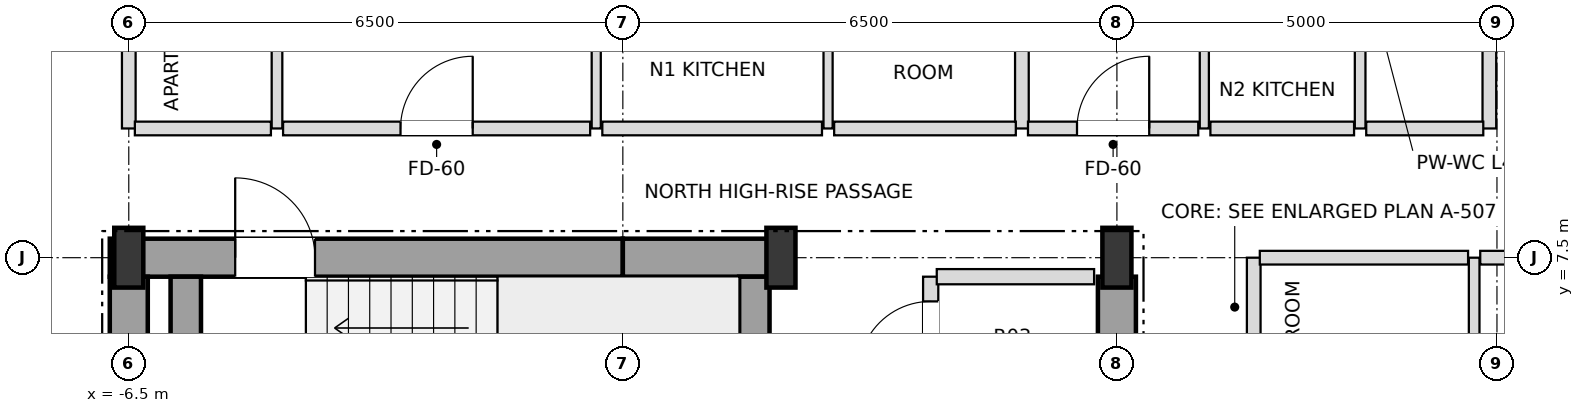
"""IFC4 building model, lengths in metres.
Left out: names, types, materials, properties, quantities, classifications, styles, units other than length and angle.
Written with IfcOpenShell. Run it as: python <this file> out.ifc"""

import sys

from ifc_helpers import new_model, si_unit, direction, frame, frame_2d, origin, origin_2d, place, context, subcontext, project, spatial, rectangle, i_section, extrude, element, fill, save


model = new_model("IFC4")
c1 = context("Model", 3, precision=1e-05, world=origin(), true_north=direction((0.0, 1.0)))
c2 = subcontext(c1, "Body", "Model", "MODEL_VIEW")
j1 = project(units=[si_unit("LENGTHUNIT", "METRE"), si_unit("PLANEANGLEUNIT", "RADIAN")], contexts=[c1])
p1 = place(None, origin())
s1 = spatial("IfcSite", under=j1, at=p1, CompositionType="ELEMENT")
p2 = place(p1, origin())
s2 = spatial("IfcBuilding", under=s1, at=p2, CompositionType="ELEMENT")
p3 = place(p2, frame((0.0, 0.0, 276.3)))
s3 = spatial("IfcBuildingStorey", under=s2, at=p3, CompositionType="ELEMENT", Elevation=276.3)
for number, where, z_axis, x_axis in (
    (1, (-6.5, 7.5, 0.0), (0.0, 0.0, 1.0), (1.0, 0.0, 0.0)),
    (2, (2.08, 7.5, 0.0), (0.0, 0.0, 1.0), (1.0, 0.0, 0.0)),
    (3, (6.5, 7.5, 0.0), (0.0, 0.0, 1.0), (1.0, 0.0, 0.0)),
):
    element("IfcColumn", number, at=place(p3, frame(where, z_axis=z_axis, x_axis=x_axis)), inside=s3, PredefinedType="COLUMN", context=c2, shape_type="SweptSolid", body=[
        extrude(i_section(OverallWidth=0.382, OverallDepth=0.786, WebThickness=0.02, FlangeThickness=0.033, at=origin_2d()), origin(), (0.0, 0.0, 1.0), 3.6),
    ])
p4 = place(p3, frame((-6.75, 7.5, 0.0), z_axis=(0.0, 0.0, 1.0), x_axis=(1.0, 0.0, 0.0)))
e4 = element("IfcWall", 4, at=p4, inside=s3, PredefinedType="SHEAR", context=c2, shape_type="SweptSolid", body=[
    extrude(rectangle(XDim=6.75, YDim=0.5, at=frame_2d((3.375, 0.0))), origin(), (0.0, 0.0, 1.0), 3.38),
])
p5 = place(p4, frame((1.65, 0.0, 0.0)))
e5 = element("IfcOpeningElement", 5, at=p5, cuts=e4, PredefinedType="OPENING", context=c2, shape_type="SweptSolid", body=[
    extrude(rectangle(XDim=1.05, YDim=2.15, at=frame_2d((0.525, 1.075))), frame((0.0, 0.26, 0.0), z_axis=(0.0, -1.0, 0.0), x_axis=(1.0, 0.0, 0.0)), (0.0, 0.0, 1.0), 0.52),
])
p6 = place(p3, frame((0.0, 7.5, 0.0), z_axis=(0.0, 0.0, 1.0), x_axis=(1.0, 0.0, 0.0)))
e6 = element("IfcWall", 6, at=p6, inside=s3, PredefinedType="SHEAR", context=c2, shape_type="SweptSolid", body=[
    extrude(rectangle(XDim=2.08, YDim=0.5, at=frame_2d((1.04, 0.0))), origin(), (0.0, 0.0, 1.0), 3.38),
])
for number, where, z_axis, x_axis in (
    (7, (-6.5, 3.95, 0.0), (0.0, 0.0, 1.0), (0.0, 1.0, 0.0)),
    (8, (6.5, 3.95, 0.0), (0.0, 0.0, 1.0), (0.0, 1.0, 0.0)),
):
    element("IfcWall", number, at=place(p3, frame(where, z_axis=z_axis, x_axis=x_axis)), inside=s3, PredefinedType="SHEAR", context=c2, shape_type="SweptSolid", body=[
        extrude(rectangle(XDim=3.3, YDim=0.5, at=frame_2d((1.65, 0.0))), origin(), (0.0, 0.0, 1.0), 3.38),
    ])
for number, where, z_axis, x_axis in (
    (9, (1.73, 3.95, 0.0), (0.0, 0.0, 1.0), (0.0, 1.0, 0.0)),
    (10, (-5.75, 3.95, 0.0), (0.0, 0.0, 1.0), (0.0, 1.0, 0.0)),
):
    element("IfcWall", number, at=place(p3, frame(where, z_axis=z_axis, x_axis=x_axis)), inside=s3, PredefinedType="SHEAR", context=c2, shape_type="SweptSolid", body=[
        extrude(rectangle(XDim=3.3, YDim=0.4, at=frame_2d((1.65, 0.0))), origin(), (0.0, 0.0, 1.0), 3.38),
    ])
p7 = place(p3, frame((-6.5, 9.2, 0.0), z_axis=(0.0, 0.0, 1.0), x_axis=(0.0, 1.0, 0.0)))
e11 = element("IfcWall", 11, at=p7, inside=s3, PredefinedType="PARTITIONING", context=c2, shape_type="SweptSolid", body=[
    extrude(rectangle(XDim=10.7, YDim=0.18, at=frame_2d((5.35, 0.0))), origin(), (0.0, 0.0, 1.0), 2.826),
])
p8 = place(p3, frame((-4.55, 9.2, 0.0), z_axis=(0.0, 0.0, 1.0), x_axis=(0.0, 1.0, 0.0)))
e12 = element("IfcWall", 12, at=p8, inside=s3, PredefinedType="PARTITIONING", context=c2, shape_type="SweptSolid", body=[
    extrude(rectangle(XDim=4.7, YDim=0.14, at=frame_2d((2.35, 0.0))), origin(), (0.0, 0.0, 1.0), 3.38),
])
p9 = place(p8, frame((1.9, 0.0, 0.0)))
e13 = element("IfcOpeningElement", 13, at=p9, cuts=e12, PredefinedType="OPENING", context=c2, shape_type="SweptSolid", body=[
    extrude(rectangle(XDim=0.9, YDim=2.1, at=frame_2d((0.45, 1.05))), frame((0.0, 0.08, 0.0), z_axis=(0.0, -1.0, 0.0), x_axis=(1.0, 0.0, 0.0)), (0.0, 0.0, 1.0), 0.16),
])
p10 = place(p3, frame((-0.35, 9.2, 0.0), z_axis=(0.0, 0.0, 1.0), x_axis=(0.0, 1.0, 0.0)))
e14 = element("IfcWall", 14, at=p10, inside=s3, PredefinedType="PARTITIONING", context=c2, shape_type="SweptSolid", body=[
    extrude(rectangle(XDim=4.7, YDim=0.12, at=frame_2d((2.35, 0.0))), origin(), (0.0, 0.0, 1.0), 3.38),
])
p11 = place(p10, frame((1.875, 0.0, 0.0)))
e15 = element("IfcOpeningElement", 15, at=p11, cuts=e14, PredefinedType="OPENING", context=c2, shape_type="SweptSolid", body=[
    extrude(rectangle(XDim=0.95, YDim=2.1, at=frame_2d((0.475, 1.05))), frame((0.0, 0.07, 0.0), z_axis=(0.0, -1.0, 0.0), x_axis=(1.0, 0.0, 0.0)), (0.0, 0.0, 1.0), 0.14),
])
p12 = place(p3, frame((2.7, 9.2, 0.0), z_axis=(0.0, 0.0, 1.0), x_axis=(0.0, 1.0, 0.0)))
e16 = element("IfcWall", 16, at=p12, inside=s3, PredefinedType="PARTITIONING", context=c2, shape_type="SweptSolid", body=[
    extrude(rectangle(XDim=4.7, YDim=0.12, at=frame_2d((2.35, 0.0))), origin(), (0.0, 0.0, 1.0), 3.38),
])
p13 = place(p12, frame((1.9, 0.0, 0.0)))
e17 = element("IfcOpeningElement", 17, at=p13, cuts=e16, PredefinedType="OPENING", context=c2, shape_type="SweptSolid", body=[
    extrude(rectangle(XDim=0.9, YDim=2.1, at=frame_2d((0.45, 1.05))), frame((0.0, 0.07, 0.0), z_axis=(0.0, -1.0, 0.0), x_axis=(1.0, 0.0, 0.0)), (0.0, 0.0, 1.0), 0.14),
])
p14 = place(p3, frame((4.05, 0.45, 0.0), z_axis=(0.0, 0.0, 1.0), x_axis=(0.0, 1.0, 0.0)))
e18 = element("IfcWall", 18, at=p14, inside=s3, PredefinedType="SOLIDWALL", context=c2, shape_type="SweptSolid", body=[
    extrude(rectangle(XDim=6.8, YDim=0.2, at=frame_2d((3.4, 0.0))), origin(), (0.0, 0.0, 1.0), 3.38),
])
p15 = place(p14, frame((1.875, 0.0, 0.0)))
e19 = element("IfcOpeningElement", 19, at=p15, cuts=e18, PredefinedType="OPENING", context=c2, shape_type="SweptSolid", body=[
    extrude(rectangle(XDim=0.95, YDim=2.15, at=frame_2d((0.475, 1.075))), frame((0.0, 0.11, 0.0), z_axis=(0.0, -1.0, 0.0), x_axis=(1.0, 0.0, 0.0)), (0.0, 0.0, 1.0), 0.22),
])
p16 = place(p14, frame((5.525, 0.0, 0.0)))
e20 = element("IfcOpeningElement", 20, at=p16, cuts=e18, PredefinedType="OPENING", context=c2, shape_type="SweptSolid", body=[
    extrude(rectangle(XDim=0.95, YDim=2.15, at=frame_2d((0.475, 1.075))), frame((0.0, 0.11, 0.0), z_axis=(0.0, -1.0, 0.0), x_axis=(1.0, 0.0, 0.0)), (0.0, 0.0, 1.0), 0.22),
])
p17 = place(p3, frame((5.25, 9.2, 0.0), z_axis=(0.0, 0.0, 1.0), x_axis=(0.0, 1.0, 0.0)))
e21 = element("IfcWall", 21, at=p17, inside=s3, PredefinedType="PARTITIONING", context=c2, shape_type="SweptSolid", body=[
    extrude(rectangle(XDim=10.7, YDim=0.18, at=frame_2d((5.35, 0.0))), origin(), (0.0, 0.0, 1.0), 3.018),
])
p18 = place(p3, frame((7.65, 9.2, 0.0), z_axis=(0.0, 0.0, 1.0), x_axis=(0.0, 1.0, 0.0)))
e22 = element("IfcWall", 22, at=p18, inside=s3, PredefinedType="PARTITIONING", context=c2, shape_type="SweptSolid", body=[
    extrude(rectangle(XDim=4.7, YDim=0.12, at=frame_2d((2.35, 0.0))), origin(), (0.0, 0.0, 1.0), 2.826),
])
p19 = place(p18, frame((1.875, 0.0, 0.0)))
e23 = element("IfcOpeningElement", 23, at=p19, cuts=e22, PredefinedType="OPENING", context=c2, shape_type="SweptSolid", body=[
    extrude(rectangle(XDim=0.95, YDim=2.1, at=frame_2d((0.475, 1.05))), frame((0.0, 0.07, 0.0), z_axis=(0.0, -1.0, 0.0), x_axis=(1.0, 0.0, 0.0)), (0.0, 0.0, 1.0), 0.14),
])
p20 = place(p3, frame((8.3, -7.5, 0.0), z_axis=(0.0, 0.0, 1.0), x_axis=(0.0, 1.0, 0.0)))
e24 = element("IfcWall", 24, at=p20, inside=s3, PredefinedType="PARTITIONING", context=c2, shape_type="SweptSolid", body=[
    extrude(rectangle(XDim=15.0, YDim=0.18, at=frame_2d((7.5, 0.0))), origin(), (0.0, 0.0, 1.0), 3.38),
])
p21 = place(p20, frame((2.355, 0.0, 0.0)))
e25 = element("IfcOpeningElement", 25, at=p21, cuts=e24, PredefinedType="OPENING", context=c2, shape_type="SweptSolid", body=[
    extrude(rectangle(XDim=0.95, YDim=2.15, at=frame_2d((0.475, 1.075))), frame((0.0, 0.1, 0.0), z_axis=(0.0, -1.0, 0.0), x_axis=(1.0, 0.0, 0.0)), (0.0, 0.0, 1.0), 0.2),
])
p22 = place(p3, frame((9.7, 9.2, 0.0), z_axis=(0.0, 0.0, 1.0), x_axis=(0.0, 1.0, 0.0)))
e26 = element("IfcWall", 26, at=p22, inside=s3, PredefinedType="PARTITIONING", context=c2, shape_type="SweptSolid", body=[
    extrude(rectangle(XDim=4.7, YDim=0.14, at=frame_2d((2.35, 0.0))), origin(), (0.0, 0.0, 1.0), 2.826),
])
p23 = place(p22, frame((1.9, 0.0, 0.0)))
e27 = element("IfcOpeningElement", 27, at=p23, cuts=e26, PredefinedType="OPENING", context=c2, shape_type="SweptSolid", body=[
    extrude(rectangle(XDim=0.9, YDim=2.1, at=frame_2d((0.45, 1.05))), frame((0.0, 0.08, 0.0), z_axis=(0.0, -1.0, 0.0), x_axis=(1.0, 0.0, 0.0)), (0.0, 0.0, 1.0), 0.16),
])
p24 = place(p3, frame((11.2, -7.5, 0.0), z_axis=(0.0, 0.0, 1.0), x_axis=(0.0, 1.0, 0.0)))
e28 = element("IfcWall", 28, at=p24, inside=s3, PredefinedType="PARTITIONING", context=c2, shape_type="SweptSolid", body=[
    extrude(rectangle(XDim=15.0, YDim=0.14, at=frame_2d((7.5, 0.0))), origin(), (0.0, 0.0, 1.0), 3.38),
])
p25 = place(p24, frame((3.475, 0.0, 0.0)))
e29 = element("IfcOpeningElement", 29, at=p25, cuts=e28, PredefinedType="OPENING", context=c2, shape_type="SweptSolid", body=[
    extrude(rectangle(XDim=0.95, YDim=2.1, at=frame_2d((0.475, 1.05))), frame((0.0, 0.08, 0.0), z_axis=(0.0, -1.0, 0.0), x_axis=(1.0, 0.0, 0.0)), (0.0, 0.0, 1.0), 0.16),
])
p26 = place(p3, frame((11.4, 9.2, 0.0), z_axis=(0.0, 0.0, 1.0), x_axis=(0.0, 1.0, 0.0)))
e30 = element("IfcWall", 30, at=p26, inside=s3, PredefinedType="PARTITIONING", context=c2, shape_type="SweptSolid", body=[
    extrude(rectangle(XDim=5.07, YDim=0.18, at=frame_2d((2.535, 0.0))), origin(), (0.0, 0.0, 1.0), 2.748),
])
p27 = place(p3, frame((4.13, 7.25, 0.0), z_axis=(0.0, 0.0, 1.0), x_axis=(1.0, 0.0, 0.0)))
e31 = element("IfcWall", 31, at=p27, inside=s3, PredefinedType="SOLIDWALL", context=c2, shape_type="SweptSolid", body=[
    extrude(rectangle(XDim=2.07, YDim=0.2, at=frame_2d((1.035, 0.0))), origin(), (0.0, 0.0, 1.0), 3.38),
])
p28 = place(p3, frame((8.38, 7.5, 0.0), z_axis=(0.0, 0.0, 1.0), x_axis=(1.0, 0.0, 0.0)))
e32 = element("IfcWall", 32, at=p28, inside=s3, PredefinedType="PARTITIONING", context=c2, shape_type="SweptSolid", body=[
    extrude(rectangle(XDim=2.74, YDim=0.18, at=frame_2d((1.37, 0.0))), origin(), (0.0, 0.0, 1.0), 2.826),
])
p29 = place(p3, frame((11.28, 7.5, 0.0), z_axis=(0.0, 0.0, 1.0), x_axis=(1.0, 0.0, 0.0)))
e33 = element("IfcWall", 33, at=p29, inside=s3, PredefinedType="PARTITIONING", context=c2, shape_type="SweptSolid", body=[
    extrude(rectangle(XDim=5.62, YDim=0.18, at=frame_2d((2.81, 0.0))), origin(), (0.0, 0.0, 1.0), 2.826),
])
p30 = place(p3, frame((-6.42, 9.2, 0.0), z_axis=(0.0, 0.0, 1.0), x_axis=(1.0, 0.0, 0.0)))
e34 = element("IfcWall", 34, at=p30, inside=s3, PredefinedType="PARTITIONING", context=c2, shape_type="SweptSolid", body=[
    extrude(rectangle(XDim=1.79, YDim=0.18, at=frame_2d((0.895, 0.0))), origin(), (0.0, 0.0, 1.0), 3.38),
])
p31 = place(p3, frame((-4.47, 9.2, 0.0), z_axis=(0.0, 0.0, 1.0), x_axis=(1.0, 0.0, 0.0)))
e35 = element("IfcWall", 35, at=p31, inside=s3, PredefinedType="PARTITIONING", context=c2, shape_type="SweptSolid", body=[
    extrude(rectangle(XDim=4.04, YDim=0.18, at=frame_2d((2.02, 0.0))), origin(), (0.0, 0.0, 1.0), 3.38),
])
p32 = place(p31, frame((1.545, 0.0, 0.0)))
e36 = element("IfcOpeningElement", 36, at=p32, cuts=e35, PredefinedType="OPENING", context=c2, shape_type="SweptSolid", body=[
    extrude(rectangle(XDim=0.95, YDim=2.15, at=frame_2d((0.475, 1.075))), frame((0.0, 0.1, 0.0), z_axis=(0.0, -1.0, 0.0), x_axis=(1.0, 0.0, 0.0)), (0.0, 0.0, 1.0), 0.2),
])
p33 = place(p3, frame((-0.27, 9.2, 0.0), z_axis=(0.0, 0.0, 1.0), x_axis=(1.0, 0.0, 0.0)))
e37 = element("IfcWall", 37, at=p33, inside=s3, PredefinedType="PARTITIONING", context=c2, shape_type="SweptSolid", body=[
    extrude(rectangle(XDim=2.89, YDim=0.18, at=frame_2d((1.445, 0.0))), origin(), (0.0, 0.0, 1.0), 3.38),
])
p34 = place(p3, frame((2.78, 9.2, 0.0), z_axis=(0.0, 0.0, 1.0), x_axis=(1.0, 0.0, 0.0)))
e38 = element("IfcWall", 38, at=p34, inside=s3, PredefinedType="PARTITIONING", context=c2, shape_type="SweptSolid", body=[
    extrude(rectangle(XDim=2.39, YDim=0.18, at=frame_2d((1.195, 0.0))), origin(), (0.0, 0.0, 1.0), 3.38),
])
p35 = place(p3, frame((5.33, 9.2, 0.0), z_axis=(0.0, 0.0, 1.0), x_axis=(1.0, 0.0, 0.0)))
e39 = element("IfcWall", 39, at=p35, inside=s3, PredefinedType="PARTITIONING", context=c2, shape_type="SweptSolid", body=[
    extrude(rectangle(XDim=2.24, YDim=0.18, at=frame_2d((1.12, 0.0))), origin(), (0.0, 0.0, 1.0), 2.826),
])
p36 = place(p35, frame((0.645, 0.0, 0.0)))
e40 = element("IfcOpeningElement", 40, at=p36, cuts=e39, PredefinedType="OPENING", context=c2, shape_type="SweptSolid", body=[
    extrude(rectangle(XDim=0.95, YDim=2.15, at=frame_2d((0.475, 1.075))), frame((0.0, 0.1, 0.0), z_axis=(0.0, -1.0, 0.0), x_axis=(1.0, 0.0, 0.0)), (0.0, 0.0, 1.0), 0.2),
])
p37 = place(p3, frame((7.73, 9.2, 0.0), z_axis=(0.0, 0.0, 1.0), x_axis=(1.0, 0.0, 0.0)))
e41 = element("IfcWall", 41, at=p37, inside=s3, PredefinedType="PARTITIONING", context=c2, shape_type="SweptSolid", body=[
    extrude(rectangle(XDim=1.89, YDim=0.18, at=frame_2d((0.945, 0.0))), origin(), (0.0, 0.0, 1.0), 3.38),
])
p38 = place(p3, frame((9.78, 9.2, 0.0), z_axis=(0.0, 0.0, 1.0), x_axis=(1.0, 0.0, 0.0)))
e42 = element("IfcWall", 42, at=p38, inside=s3, PredefinedType="PARTITIONING", context=c2, shape_type="SweptSolid", body=[
    extrude(rectangle(XDim=1.54, YDim=0.18, at=frame_2d((0.77, 0.0))), origin(), (0.0, 0.0, 1.0), 3.38),
])
p39 = place(p5, origin())
e43 = element("IfcDoor", 43, at=p39, inside=s3, OperationType="SINGLE_SWING_LEFT", PredefinedType="DOOR", context=c2, shape_type="SweptSolid", body=[
    extrude(rectangle(XDim=1.05, YDim=2.15, at=frame_2d((0.525, 1.075))), frame((0.0, 0.025, 0.0), z_axis=(0.0, -1.0, 0.0), x_axis=(1.0, 0.0, 0.0)), (0.0, 0.0, 1.0), 0.05),
])
fill(e5, e43)
p40 = place(p16, origin())
e44 = element("IfcDoor", 44, at=p40, inside=s3, OperationType="SINGLE_SWING_LEFT", PredefinedType="DOOR", context=c2, shape_type="SweptSolid", body=[
    extrude(rectangle(XDim=0.95, YDim=2.15, at=frame_2d((0.475, 1.075))), frame((0.0, 0.025, 0.0), z_axis=(0.0, -1.0, 0.0), x_axis=(1.0, 0.0, 0.0)), (0.0, 0.0, 1.0), 0.05),
])
fill(e20, e44)
p41 = place(p32, origin())
e45 = element("IfcDoor", 45, at=p41, inside=s3, OperationType="SINGLE_SWING_RIGHT", PredefinedType="DOOR", context=c2, shape_type="SweptSolid", body=[
    extrude(rectangle(XDim=0.95, YDim=2.15, at=frame_2d((0.475, 1.075))), frame((0.0, 0.025, 0.0), z_axis=(0.0, -1.0, 0.0), x_axis=(1.0, 0.0, 0.0)), (0.0, 0.0, 1.0), 0.05),
])
fill(e36, e45)
p42 = place(p36, origin())
e46 = element("IfcDoor", 46, at=p42, inside=s3, OperationType="SINGLE_SWING_RIGHT", PredefinedType="DOOR", context=c2, shape_type="SweptSolid", body=[
    extrude(rectangle(XDim=0.95, YDim=2.15, at=frame_2d((0.475, 1.075))), frame((0.0, 0.025, 0.0), z_axis=(0.0, -1.0, 0.0), x_axis=(1.0, 0.0, 0.0)), (0.0, 0.0, 1.0), 0.05),
])
fill(e40, e46)
save(model, sys.argv[1])
